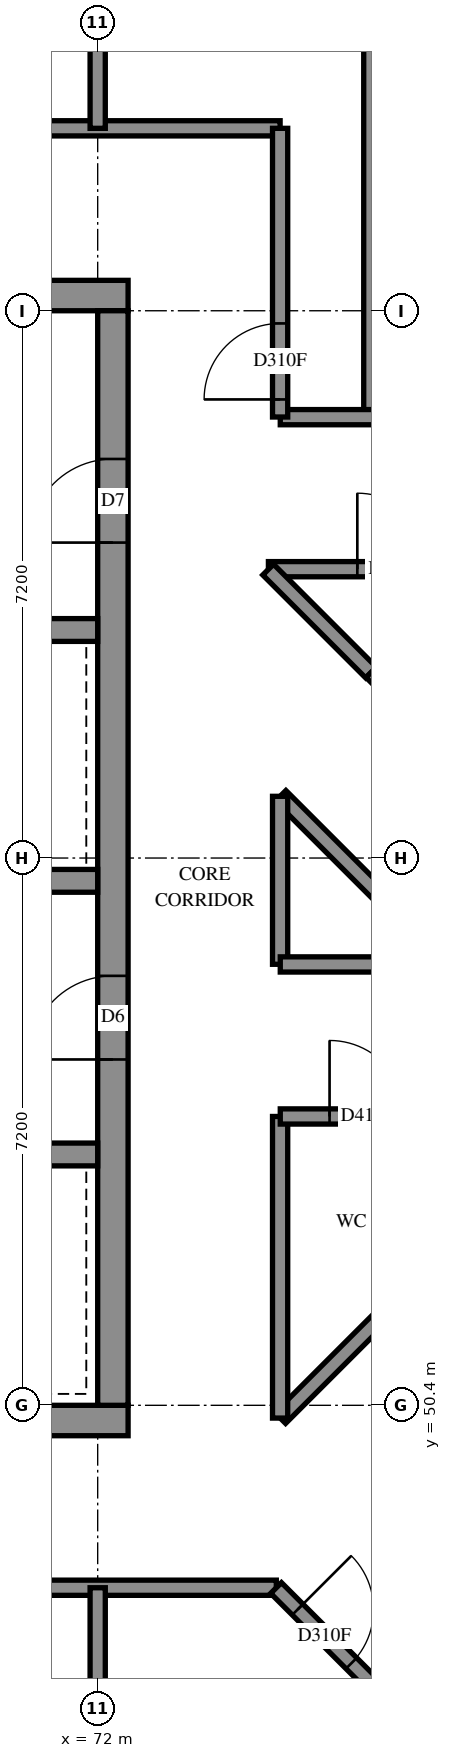
"""IFC4 building model, lengths in metres.
Left out: names, types, materials, properties, quantities, classifications, styles, units other than length and angle.
Written with IfcOpenShell. Run it as: python <this file> out.ifc"""

import sys

from ifc_helpers import new_model, si_unit, direction, frame, frame_2d, origin, place, context, subcontext, project, spatial, rectangle, extrude, element, fill, save


model = new_model("IFC4")
c1 = context("Model", 3, precision=1e-05, world=origin(), true_north=direction((0.0, 1.0)))
c2 = subcontext(c1, "Body", "Model", "MODEL_VIEW")
j1 = project(units=[si_unit("LENGTHUNIT", "METRE"), si_unit("PLANEANGLEUNIT", "RADIAN")], contexts=[c1])
p1 = place(None, origin())
s1 = spatial("IfcSite", under=j1, at=p1, CompositionType="ELEMENT")
p2 = place(p1, origin())
s2 = spatial("IfcBuilding", under=s1, at=p2, CompositionType="ELEMENT")
p3 = place(p2, frame((0.0, 0.0, 247.2)))
s3 = spatial("IfcBuildingStorey", under=s2, at=p3, CompositionType="ELEMENT", Elevation=247.2)
p4 = place(p3, frame((57.2, 50.2, -0.3), z_axis=(0.0, 0.0, 1.0), x_axis=(1.0, 0.0, 0.0)))
e1 = element("IfcWall", 1, at=p4, inside=s3, PredefinedType="SHEAR", context=c2, shape_type="SweptSolid", body=[
    extrude(rectangle(XDim=15.2, YDim=0.4, at=frame_2d((7.6, 0.0))), origin(), (0.0, 0.0, 1.0), 2.7),
])
p5 = place(p3, frame((57.2, 65.0, -0.3), z_axis=(0.0, 0.0, 1.0), x_axis=(1.0, 0.0, 0.0)))
e2 = element("IfcWall", 2, at=p5, inside=s3, PredefinedType="SHEAR", context=c2, shape_type="SweptSolid", body=[
    extrude(rectangle(XDim=15.2, YDim=0.4, at=frame_2d((7.6, 0.0))), origin(), (0.0, 0.0, 1.0), 2.7),
])
p6 = place(p5, frame((10.4, 0.0, 0.3)))
e3 = element("IfcOpeningElement", 3, at=p6, cuts=e2, PredefinedType="OPENING", context=c2, shape_type="SweptSolid", body=[
    extrude(rectangle(XDim=0.8, YDim=2.1, at=frame_2d((0.4, 1.05))), frame((0.0, 0.21, 0.0), z_axis=(0.0, -1.0, 0.0), x_axis=(1.0, 0.0, 0.0)), (0.0, 0.0, 1.0), 0.42),
])
p7 = place(p3, frame((72.2, 50.4, -0.3), z_axis=(0.0, 0.0, 1.0), x_axis=(0.0, 1.0, 0.0)))
e4 = element("IfcWall", 4, at=p7, inside=s3, PredefinedType="SHEAR", context=c2, shape_type="SweptSolid", body=[
    extrude(rectangle(XDim=14.4, YDim=0.4, at=frame_2d((7.2, 0.0))), origin(), (0.0, 0.0, 1.0), 2.7),
])
p8 = place(p7, frame((4.55, 0.0, 0.3)))
e5 = element("IfcOpeningElement", 5, at=p8, cuts=e4, PredefinedType="OPENING", context=c2, shape_type="SweptSolid", body=[
    extrude(rectangle(XDim=1.1, YDim=2.1, at=frame_2d((0.55, 1.05))), frame((0.0, 0.21, 0.0), z_axis=(0.0, -1.0, 0.0), x_axis=(1.0, 0.0, 0.0)), (0.0, 0.0, 1.0), 0.42),
])
p9 = place(p7, frame((11.35, 0.0, 0.3)))
e6 = element("IfcOpeningElement", 6, at=p9, cuts=e4, PredefinedType="OPENING", context=c2, shape_type="SweptSolid", body=[
    extrude(rectangle(XDim=1.1, YDim=2.1, at=frame_2d((0.55, 1.05))), frame((0.0, 0.21, 0.0), z_axis=(0.0, -1.0, 0.0), x_axis=(1.0, 0.0, 0.0)), (0.0, 0.0, 1.0), 0.42),
])
p10 = place(p3, frame((57.6, 53.7, 0.0), z_axis=(0.0, 0.0, 1.0), x_axis=(1.0, 0.0, 0.0)))
e7 = element("IfcWall", 7, at=p10, inside=s3, PredefinedType="SOLIDWALL", context=c2, shape_type="SweptSolid", body=[
    extrude(rectangle(XDim=14.4, YDim=0.3, at=frame_2d((7.2, 0.0))), origin(), (0.0, 0.0, 1.0), 3.1),
])
p11 = place(p10, frame((1.35, 0.0, 0.0)))
e8 = element("IfcOpeningElement", 8, at=p11, cuts=e7, PredefinedType="OPENING", context=c2, shape_type="SweptSolid", body=[
    extrude(rectangle(XDim=0.9, YDim=2.1, at=frame_2d((0.45, 1.05))), frame((0.0, 0.16, 0.0), z_axis=(0.0, -1.0, 0.0), x_axis=(1.0, 0.0, 0.0)), (0.0, 0.0, 1.0), 0.32),
])
p12 = place(p10, frame((4.95, 0.0, 0.0)))
e9 = element("IfcOpeningElement", 9, at=p12, cuts=e7, PredefinedType="OPENING", context=c2, shape_type="SweptSolid", body=[
    extrude(rectangle(XDim=0.9, YDim=2.1, at=frame_2d((0.45, 1.05))), frame((0.0, 0.16, 0.0), z_axis=(0.0, -1.0, 0.0), x_axis=(1.0, 0.0, 0.0)), (0.0, 0.0, 1.0), 0.32),
])
p13 = place(p10, frame((8.55, 0.0, 0.0)))
e10 = element("IfcOpeningElement", 10, at=p13, cuts=e7, PredefinedType="OPENING", context=c2, shape_type="SweptSolid", body=[
    extrude(rectangle(XDim=0.9, YDim=2.1, at=frame_2d((0.45, 1.05))), frame((0.0, 0.16, 0.0), z_axis=(0.0, -1.0, 0.0), x_axis=(1.0, 0.0, 0.0)), (0.0, 0.0, 1.0), 0.32),
])
p14 = place(p10, frame((12.05, 0.0, 0.0)))
e11 = element("IfcOpeningElement", 11, at=p14, cuts=e7, PredefinedType="OPENING", context=c2, shape_type="SweptSolid", body=[
    extrude(rectangle(XDim=1.1, YDim=2.1, at=frame_2d((0.55, 1.05))), frame((0.0, 0.16, 0.0), z_axis=(0.0, -1.0, 0.0), x_axis=(1.0, 0.0, 0.0)), (0.0, 0.0, 1.0), 0.32),
])
p15 = place(p3, frame((57.6, 57.3, 0.0), z_axis=(0.0, 0.0, 1.0), x_axis=(1.0, 0.0, 0.0)))
e12 = element("IfcWall", 12, at=p15, inside=s3, PredefinedType="SOLIDWALL", context=c2, shape_type="SweptSolid", body=[
    extrude(rectangle(XDim=14.4, YDim=0.3, at=frame_2d((7.2, 0.0))), origin(), (0.0, 0.0, 1.0), 3.1),
])
p16 = place(p15, frame((8.55, 0.0, 0.0)))
e13 = element("IfcOpeningElement", 13, at=p16, cuts=e12, PredefinedType="OPENING", context=c2, shape_type="SweptSolid", body=[
    extrude(rectangle(XDim=0.9, YDim=2.1, at=frame_2d((0.45, 1.05))), frame((0.0, 0.16, 0.0), z_axis=(0.0, -1.0, 0.0), x_axis=(1.0, 0.0, 0.0)), (0.0, 0.0, 1.0), 0.32),
])
p17 = place(p15, frame((1.25, 0.0, 0.0)))
e14 = element("IfcOpeningElement", 14, at=p17, cuts=e12, PredefinedType="OPENING", context=c2, shape_type="SweptSolid", body=[
    extrude(rectangle(XDim=1.1, YDim=2.1, at=frame_2d((0.55, 1.05))), frame((0.0, 0.16, 0.0), z_axis=(0.0, -1.0, 0.0), x_axis=(1.0, 0.0, 0.0)), (0.0, 0.0, 1.0), 0.32),
])
p18 = place(p15, frame((4.85, 0.0, 0.0)))
e15 = element("IfcOpeningElement", 15, at=p18, cuts=e12, PredefinedType="OPENING", context=c2, shape_type="SweptSolid", body=[
    extrude(rectangle(XDim=1.1, YDim=2.1, at=frame_2d((0.55, 1.05))), frame((0.0, 0.16, 0.0), z_axis=(0.0, -1.0, 0.0), x_axis=(1.0, 0.0, 0.0)), (0.0, 0.0, 1.0), 0.32),
])
p19 = place(p15, frame((12.05, 0.0, 0.0)))
e16 = element("IfcOpeningElement", 16, at=p19, cuts=e12, PredefinedType="OPENING", context=c2, shape_type="SweptSolid", body=[
    extrude(rectangle(XDim=1.1, YDim=2.1, at=frame_2d((0.55, 1.05))), frame((0.0, 0.16, 0.0), z_axis=(0.0, -1.0, 0.0), x_axis=(1.0, 0.0, 0.0)), (0.0, 0.0, 1.0), 0.32),
])
p20 = place(p3, frame((64.8, 60.6, 0.0), z_axis=(0.0, 0.0, 1.0), x_axis=(1.0, 0.0, 0.0)))
e17 = element("IfcWall", 17, at=p20, inside=s3, PredefinedType="SOLIDWALL", context=c2, shape_type="SweptSolid", body=[
    extrude(rectangle(XDim=7.2, YDim=0.3, at=frame_2d((3.6, 0.0))), origin(), (0.0, 0.0, 1.0), 3.1),
])
p21 = place(p3, frame((55.2, 67.2, 0.0), z_axis=(0.0, 0.0, 1.0), x_axis=(1.0, 0.0, 0.0)))
e18 = element("IfcWall", 18, at=p21, inside=s3, PredefinedType="PARTITIONING", context=c2, shape_type="SweptSolid", body=[
    extrude(rectangle(XDim=19.2, YDim=0.2, at=frame_2d((9.6, 0.0))), origin(), (0.0, 0.0, 1.0), 3.1),
])
p22 = place(p21, frame((6.299, 0.0, 0.0)))
e19 = element("IfcOpeningElement", 19, at=p22, cuts=e18, PredefinedType="OPENING", context=c2, shape_type="SweptSolid", body=[
    extrude(rectangle(XDim=0.9, YDim=2.1, at=frame_2d((0.45, 1.05))), frame((0.0, 0.11, 0.0), z_axis=(0.0, -1.0, 0.0), x_axis=(1.0, 0.0, 0.0)), (0.0, 0.0, 1.0), 0.22),
])
p23 = place(p21, frame((13.65, 0.0, 0.0)))
e20 = element("IfcOpeningElement", 20, at=p23, cuts=e18, PredefinedType="OPENING", context=c2, shape_type="SweptSolid", body=[
    extrude(rectangle(XDim=0.9, YDim=2.1, at=frame_2d((0.45, 1.05))), frame((0.0, 0.11, 0.0), z_axis=(0.0, -1.0, 0.0), x_axis=(1.0, 0.0, 0.0)), (0.0, 0.0, 1.0), 0.22),
])
p24 = place(p3, frame((55.2, 48.0, 0.0), z_axis=(0.0, 0.0, 1.0), x_axis=(1.0, 0.0, 0.0)))
e21 = element("IfcWall", 21, at=p24, inside=s3, PredefinedType="PARTITIONING", context=c2, shape_type="SweptSolid", body=[
    extrude(rectangle(XDim=19.15, YDim=0.2, at=frame_2d((9.575, 0.0))), origin(), (0.0, 0.0, 1.0), 3.1),
])
p25 = place(p24, frame((6.299, 0.0, 0.0)))
e22 = element("IfcOpeningElement", 22, at=p25, cuts=e21, PredefinedType="OPENING", context=c2, shape_type="SweptSolid", body=[
    extrude(rectangle(XDim=0.9, YDim=2.1, at=frame_2d((0.45, 1.05))), frame((0.0, 0.11, 0.0), z_axis=(0.0, -1.0, 0.0), x_axis=(1.0, 0.0, 0.0)), (0.0, 0.0, 1.0), 0.22),
])
p26 = place(p24, frame((13.499, 0.0, 0.0)))
e23 = element("IfcOpeningElement", 23, at=p26, cuts=e21, PredefinedType="OPENING", context=c2, shape_type="SweptSolid", body=[
    extrude(rectangle(XDim=0.9, YDim=2.1, at=frame_2d((0.45, 1.05))), frame((0.0, 0.11, 0.0), z_axis=(0.0, -1.0, 0.0), x_axis=(1.0, 0.0, 0.0)), (0.0, 0.0, 1.0), 0.22),
])
p27 = place(p3, frame((75.6, 63.4, 0.0), z_axis=(0.0, 0.0, 1.0), x_axis=(0.0, 1.0, 0.0)))
e24 = element("IfcWall", 24, at=p27, inside=s3, PredefinedType="PARTITIONING", context=c2, shape_type="SweptSolid", body=[
    extrude(rectangle(XDim=9.406, YDim=0.2, at=frame_2d((4.703, 0.0))), origin(), (0.0, 0.0, 1.0), 3.1),
])
p28 = place(p3, frame((74.401, 50.233, 0.0), z_axis=(0.0, 0.0, 1.0), x_axis=(0.7071067812, 0.7071067812, 0.0)))
e25 = element("IfcWall", 25, at=p28, inside=s3, PredefinedType="PARTITIONING", context=c2, shape_type="SweptSolid", body=[
    extrude(rectangle(XDim=5.609, YDim=0.2, at=frame_2d((2.804, 0.0))), origin(), (0.0, 0.0, 1.0), 3.1),
])
p29 = place(p3, frame((74.246, 61.4, 0.0), z_axis=(0.0, 0.0, 1.0), x_axis=(1.0, 0.0, 0.0)))
e26 = element("IfcWall", 26, at=p29, inside=s3, PredefinedType="PARTITIONING", context=c2, shape_type="SweptSolid", body=[
    extrude(rectangle(XDim=4.954, YDim=0.2, at=frame_2d((2.477, 0.0))), origin(), (0.0, 0.0, 1.0), 3.1),
])
p30 = place(p29, frame((1.17, 0.0, 0.0)))
e27 = element("IfcOpeningElement", 27, at=p30, cuts=e26, PredefinedType="OPENING", context=c2, shape_type="SweptSolid", body=[
    extrude(rectangle(XDim=1.0, YDim=2.1, at=frame_2d((0.5, 1.05))), frame((0.0, 0.11, 0.0), z_axis=(0.0, -1.0, 0.0), x_axis=(1.0, 0.0, 0.0)), (0.0, 0.0, 1.0), 0.22),
])
p31 = place(p3, frame((74.402, 63.4, 0.0), z_axis=(0.0, 0.0, 1.0), x_axis=(1.0, 0.0, 0.0)))
e28 = element("IfcWall", 28, at=p31, inside=s3, PredefinedType="PARTITIONING", context=c2, shape_type="SweptSolid", body=[
    extrude(rectangle(XDim=4.798, YDim=0.2, at=frame_2d((2.399, 0.0))), origin(), (0.0, 0.0, 1.0), 3.1),
])
p32 = place(p31, frame((1.766, 0.0, 0.0)))
e29 = element("IfcOpeningElement", 29, at=p32, cuts=e28, PredefinedType="OPENING", context=c2, shape_type="SweptSolid", body=[
    extrude(rectangle(XDim=1.0, YDim=2.1, at=frame_2d((0.5, 1.05))), frame((0.0, 0.11, 0.0), z_axis=(0.0, -1.0, 0.0), x_axis=(1.0, 0.0, 0.0)), (0.0, 0.0, 1.0), 0.22),
])
p33 = place(p3, frame((74.347, 47.997, 0.0), z_axis=(0.0, 0.0, 1.0), x_axis=(0.7071067812, -0.7071067812, 0.0)))
e30 = element("IfcWall", 30, at=p33, inside=s3, PredefinedType="PARTITIONING", context=c2, shape_type="SweptSolid", body=[
    extrude(rectangle(XDim=4.596, YDim=0.2, at=frame_2d((2.298, 0.0))), origin(), (0.0, 0.0, 1.0), 3.1),
])
p34 = place(p33, frame((0.401, 0.0, 0.0)))
e31 = element("IfcOpeningElement", 31, at=p34, cuts=e30, PredefinedType="OPENING", context=c2, shape_type="SweptSolid", body=[
    extrude(rectangle(XDim=1.0, YDim=2.1, at=frame_2d((0.5, 1.05))), frame((0.0, 0.11, 0.0), z_axis=(0.0, -1.0, 0.0), x_axis=(1.0, 0.0, 0.0)), (0.0, 0.0, 1.0), 0.22),
])
p35 = place(p3, frame((72.0, 43.55, 0.0), z_axis=(0.0, 0.0, 1.0), x_axis=(0.0, 1.0, 0.0)))
e32 = element("IfcWall", 32, at=p35, inside=s3, PredefinedType="PARTITIONING", context=c2, shape_type="SweptSolid", body=[
    extrude(rectangle(XDim=4.45, YDim=0.2, at=frame_2d((2.225, 0.0))), origin(), (0.0, 0.0, 1.0), 3.1),
])
p36 = place(p3, frame((72.0, 67.2, 0.0), z_axis=(0.0, 0.0, 1.0), x_axis=(0.0, 1.0, 0.0)))
e33 = element("IfcWall", 33, at=p36, inside=s3, PredefinedType="PARTITIONING", context=c2, shape_type="SweptSolid", body=[
    extrude(rectangle(XDim=4.346, YDim=0.2, at=frame_2d((2.173, 0.0))), origin(), (0.0, 0.0, 1.0), 3.1),
])
p37 = place(p3, frame((74.4, 50.232, 0.0), z_axis=(0.0, 0.0, 1.0), x_axis=(0.0, 1.0, 0.0)))
e34 = element("IfcWall", 34, at=p37, inside=s3, PredefinedType="PARTITIONING", context=c2, shape_type="SweptSolid", body=[
    extrude(rectangle(XDim=3.968, YDim=0.2, at=frame_2d((1.984, 0.0))), origin(), (0.0, 0.0, 1.0), 3.1),
])
p38 = place(p3, frame((74.402, 54.2, 0.0), z_axis=(0.0, 0.0, 1.0), x_axis=(1.0, 0.0, 0.0)))
e35 = element("IfcWall", 35, at=p38, inside=s3, PredefinedType="PARTITIONING", context=c2, shape_type="SweptSolid", body=[
    extrude(rectangle(XDim=3.966, YDim=0.2, at=frame_2d((1.983, 0.0))), origin(), (0.0, 0.0, 1.0), 3.1),
])
p39 = place(p38, frame((0.649, 0.0, 0.0)))
e36 = element("IfcOpeningElement", 36, at=p39, cuts=e35, PredefinedType="OPENING", context=c2, shape_type="SweptSolid", body=[
    extrude(rectangle(XDim=1.0, YDim=2.1, at=frame_2d((0.5, 1.05))), frame((0.0, 0.11, 0.0), z_axis=(0.0, -1.0, 0.0), x_axis=(1.0, 0.0, 0.0)), (0.0, 0.0, 1.0), 0.22),
])
p40 = place(p3, frame((74.4, 63.402, 0.0), z_axis=(0.0, 0.0, 1.0), x_axis=(0.0, 1.0, 0.0)))
e37 = element("IfcWall", 37, at=p40, inside=s3, PredefinedType="PARTITIONING", context=c2, shape_type="SweptSolid", body=[
    extrude(rectangle(XDim=3.798, YDim=0.2, at=frame_2d((1.899, 0.0))), origin(), (0.0, 0.0, 1.0), 3.1),
])
p41 = place(p40, frame((0.231, 0.0, 0.0)))
e38 = element("IfcOpeningElement", 38, at=p41, cuts=e37, PredefinedType="OPENING", context=c2, shape_type="SweptSolid", body=[
    extrude(rectangle(XDim=1.0, YDim=2.1, at=frame_2d((0.5, 1.05))), frame((0.0, 0.11, 0.0), z_axis=(0.0, -1.0, 0.0), x_axis=(1.0, 0.0, 0.0)), (0.0, 0.0, 1.0), 0.22),
])
p42 = place(p3, frame((74.406, 58.417, 0.0), z_axis=(0.0, 0.0, 1.0), x_axis=(0.7071067812, -0.7071067812, 0.0)))
e39 = element("IfcWall", 39, at=p42, inside=s3, PredefinedType="PARTITIONING", context=c2, shape_type="SweptSolid", body=[
    extrude(rectangle(XDim=3.128, YDim=0.2, at=frame_2d((1.564, 0.0))), origin(), (0.0, 0.0, 1.0), 3.1),
])
for number, where, z_axis, x_axis in (
    (40, (74.4, 56.202, 0.0), (0.0, 0.0, 1.0), (0.0, 1.0, 0.0)),
    (41, (74.402, 56.2, 0.0), (0.0, 0.0, 1.0), (1.0, 0.0, 0.0)),
):
    element("IfcWall", number, at=place(p3, frame(where, z_axis=z_axis, x_axis=x_axis)), inside=s3, PredefinedType="PARTITIONING", context=c2, shape_type="SweptSolid", body=[
        extrude(rectangle(XDim=2.21, YDim=0.2, at=frame_2d((1.105, 0.0))), origin(), (0.0, 0.0, 1.0), 3.1),
    ])
p43 = place(p3, frame((74.243, 61.395, 0.0), z_axis=(0.0, 0.0, 1.0), x_axis=(0.7071067812, -0.7071067812, 0.0)))
e42 = element("IfcWall", 42, at=p43, inside=s3, PredefinedType="PARTITIONING", context=c2, shape_type="SweptSolid", body=[
    extrude(rectangle(XDim=1.915, YDim=0.2, at=frame_2d((0.957, 0.0))), origin(), (0.0, 0.0, 1.0), 3.1),
])
p44 = place(p3, frame((75.602, 60.046, 0.0), z_axis=(0.0, 0.0, 1.0), x_axis=(0.7063318703, -0.7078808437, 0.0)))
e43 = element("IfcWall", 43, at=p44, inside=s3, PredefinedType="PARTITIONING", context=c2, shape_type="SweptSolid", body=[
    extrude(rectangle(XDim=1.291, YDim=0.2, at=frame_2d((0.646, 0.0))), origin(), (0.0, 0.0, 1.0), 3.1),
])
p45 = place(p8, origin())
e44 = element("IfcDoor", 44, at=p45, inside=s3, OperationType="DOUBLE_DOOR_SINGLE_SWING", PredefinedType="DOOR", context=c2, shape_type="SweptSolid", body=[
    extrude(rectangle(XDim=1.1, YDim=2.1, at=frame_2d((0.55, 1.05))), frame((0.0, 0.025, 0.0), z_axis=(0.0, -1.0, 0.0), x_axis=(1.0, 0.0, 0.0)), (0.0, 0.0, 1.0), 0.05),
])
fill(e5, e44)
p46 = place(p9, origin())
e45 = element("IfcDoor", 45, at=p46, inside=s3, OperationType="SINGLE_SWING_RIGHT", PredefinedType="DOOR", context=c2, shape_type="SweptSolid", body=[
    extrude(rectangle(XDim=1.1, YDim=2.1, at=frame_2d((0.55, 1.05))), frame((0.0, 0.025, 0.0), z_axis=(0.0, -1.0, 0.0), x_axis=(1.0, 0.0, 0.0)), (0.0, 0.0, 1.0), 0.05),
])
fill(e6, e45)
p47 = place(p34, origin())
e46 = element("IfcDoor", 46, at=p47, inside=s3, OperationType="SINGLE_SWING_LEFT", PredefinedType="DOOR", context=c2, shape_type="SweptSolid", body=[
    extrude(rectangle(XDim=1.0, YDim=2.1, at=frame_2d((0.5, 1.05))), frame((0.0, 0.025, 0.0), z_axis=(0.0, -1.0, 0.0), x_axis=(1.0, 0.0, 0.0)), (0.0, 0.0, 1.0), 0.05),
])
fill(e31, e46)
p48 = place(p39, origin())
e47 = element("IfcDoor", 47, at=p48, inside=s3, OperationType="SINGLE_SWING_RIGHT", PredefinedType="DOOR", context=c2, shape_type="SweptSolid", body=[
    extrude(rectangle(XDim=1.0, YDim=2.1, at=frame_2d((0.5, 1.05))), frame((0.0, 0.025, 0.0), z_axis=(0.0, -1.0, 0.0), x_axis=(1.0, 0.0, 0.0)), (0.0, 0.0, 1.0), 0.05),
])
fill(e36, e47)
p49 = place(p41, origin())
e48 = element("IfcDoor", 48, at=p49, inside=s3, OperationType="SINGLE_SWING_RIGHT", PredefinedType="DOOR", context=c2, shape_type="SweptSolid", body=[
    extrude(rectangle(XDim=1.0, YDim=2.1, at=frame_2d((0.5, 1.05))), frame((0.0, 0.025, 0.0), z_axis=(0.0, -1.0, 0.0), x_axis=(1.0, 0.0, 0.0)), (0.0, 0.0, 1.0), 0.05),
])
fill(e38, e48)
p50 = place(p30, origin())
e49 = element("IfcDoor", 49, at=p50, inside=s3, OperationType="SINGLE_SWING_RIGHT", PredefinedType="DOOR", context=c2, shape_type="SweptSolid", body=[
    extrude(rectangle(XDim=1.0, YDim=2.1, at=frame_2d((0.5, 1.05))), frame((0.0, 0.025, 0.0), z_axis=(0.0, -1.0, 0.0), x_axis=(1.0, 0.0, 0.0)), (0.0, 0.0, 1.0), 0.05),
])
fill(e27, e49)
save(model, sys.argv[1])
